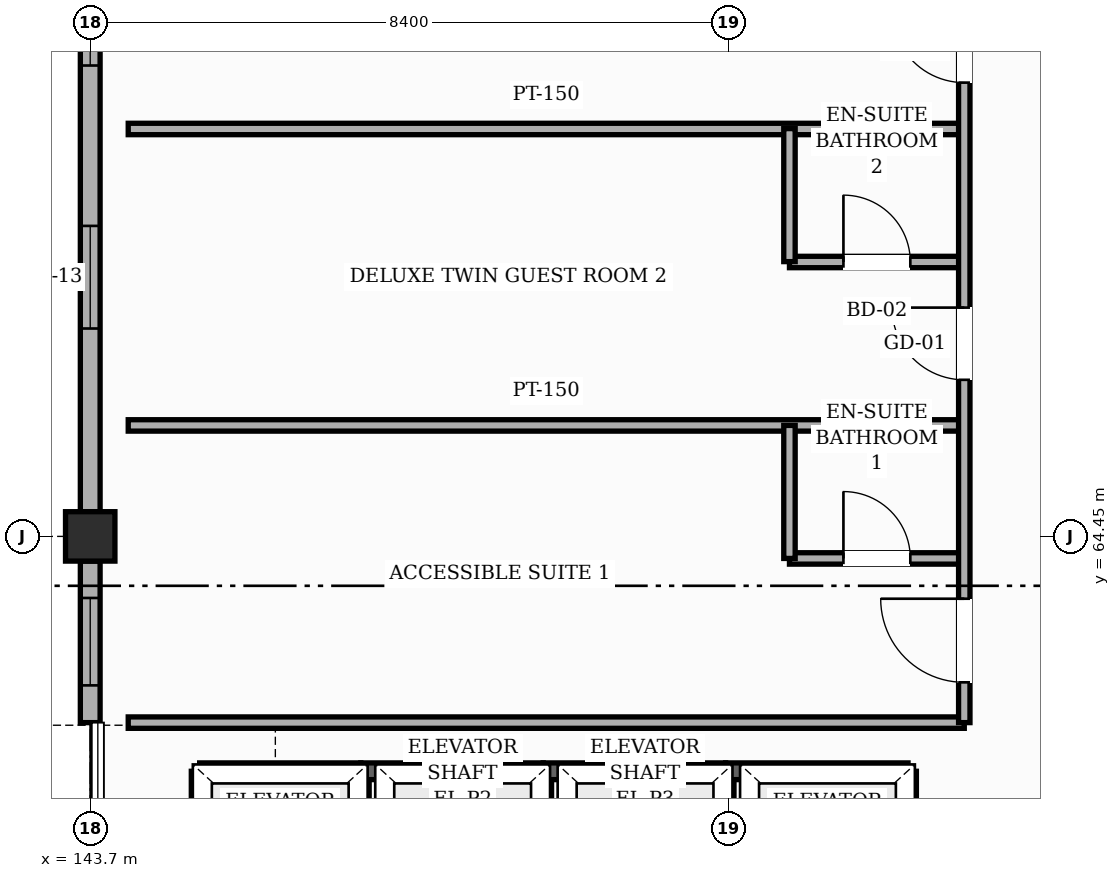
"""IFC4 building model, lengths in metres.
Left out: names, types, materials, properties, quantities, classifications, styles, units other than length and angle.
Written with IfcOpenShell. Run it as: python <this file> out.ifc"""

import sys

from ifc_helpers import new_model, si_unit, direction, frame, frame_2d, origin, origin_2d, place, context, subcontext, project, spatial, rectangle, hollow_rectangle, extrude, element, fill, save


model = new_model("IFC4")
c1 = context("Model", 3, precision=1e-05, world=origin(), true_north=direction((0.0, 1.0)))
c2 = subcontext(c1, "Body", "Model", "MODEL_VIEW")
j1 = project(units=[si_unit("LENGTHUNIT", "METRE"), si_unit("PLANEANGLEUNIT", "RADIAN")], contexts=[c1])
p1 = place(None, origin())
s1 = spatial("IfcSite", under=j1, at=p1, CompositionType="ELEMENT")
p2 = place(p1, origin())
s2 = spatial("IfcBuilding", under=s1, at=p2, CompositionType="ELEMENT")
p3 = place(p2, frame((0.0, 0.0, 15.0)))
s3 = spatial("IfcBuildingStorey", under=s2, at=p3, CompositionType="ELEMENT", Elevation=15.0)
p4 = place(p3, frame((143.7, 64.45, 0.0), z_axis=(0.0, 0.0, 1.0), x_axis=(1.0, 0.0, 0.0)))
e1 = element("IfcColumn", 1, at=p4, inside=s3, PredefinedType="COLUMN", context=c2, shape_type="SweptSolid", body=[
    extrude(hollow_rectangle(XDim=0.65, YDim=0.65, WallThickness=0.025, InnerFilletRadius=0.025, OuterFilletRadius=0.05, at=origin_2d()), origin(), (0.0, 0.0, 1.0), 4.8),
])
p5 = place(p3, frame((143.7, 62.0, 0.0), z_axis=(0.0, 0.0, 1.0), x_axis=(0.0, 1.0, 0.0)))
e2 = element("IfcWall", 2, at=p5, inside=s3, PredefinedType="SOLIDWALL", context=c2, shape_type="SweptSolid", body=[
    extrude(rectangle(XDim=2.125, YDim=0.26, at=frame_2d((1.062, 0.0))), origin(), (0.0, 0.0, 1.0), 3.985),
])
p6 = place(p5, frame((0.49, 0.0, 0.85)))
e3 = element("IfcOpeningElement", 3, at=p6, cuts=e2, PredefinedType="OPENING", context=c2, shape_type="SweptSolid", body=[
    extrude(rectangle(XDim=1.15, YDim=1.65, at=frame_2d((0.575, 0.825))), frame((0.0, 0.14, 0.0), z_axis=(0.0, -1.0, 0.0), x_axis=(1.0, 0.0, 0.0)), (0.0, 0.0, 1.0), 0.28),
])
p7 = place(p3, frame((143.7, 64.775, 0.0), z_axis=(0.0, 0.0, 1.0), x_axis=(0.0, 1.0, 0.0)))
e4 = element("IfcWall", 4, at=p7, inside=s3, PredefinedType="SOLIDWALL", context=c2, shape_type="SweptSolid", body=[
    extrude(rectangle(XDim=8.25, YDim=0.26, at=frame_2d((4.125, 0.0))), origin(), (0.0, 0.0, 1.0), 3.835),
])
p8 = place(p7, frame((2.41, 0.0, 0.85)))
e5 = element("IfcOpeningElement", 5, at=p8, cuts=e4, PredefinedType="OPENING", context=c2, shape_type="SweptSolid", body=[
    extrude(rectangle(XDim=1.35, YDim=1.65, at=frame_2d((0.675, 0.825))), frame((0.0, 0.14, 0.0), z_axis=(0.0, -1.0, 0.0), x_axis=(1.0, 0.0, 0.0)), (0.0, 0.0, 1.0), 0.28),
])
p9 = place(p7, frame((5.87, 0.0, 0.85)))
e6 = element("IfcOpeningElement", 6, at=p9, cuts=e4, PredefinedType="OPENING", context=c2, shape_type="SweptSolid", body=[
    extrude(rectangle(XDim=1.55, YDim=1.65, at=frame_2d((0.775, 0.825))), frame((0.0, 0.14, 0.0), z_axis=(0.0, -1.0, 0.0), x_axis=(1.0, 0.0, 0.0)), (0.0, 0.0, 1.0), 0.28),
])
p10 = place(p3, frame((145.14, 61.36, 0.0), z_axis=(0.0, 0.0, 1.0), x_axis=(1.0, 0.0, 0.0)))
e7 = element("IfcWall", 7, at=p10, inside=s3, PredefinedType="SHEAR", context=c2, shape_type="SweptSolid", body=[
    extrude(rectangle(XDim=2.12, YDim=0.22, at=frame_2d((1.06, 0.0))), origin(), (0.0, 0.0, 1.0), 4.56),
])
for number, where, z_axis, x_axis in (
    (8, (147.26, 59.44, 0.0), (0.0, 0.0, 1.0), (0.0, 1.0, 0.0)),
    (9, (145.14, 59.44, 0.0), (0.0, 0.0, 1.0), (0.0, 1.0, 0.0)),
):
    element("IfcWall", number, at=place(p3, frame(where, z_axis=z_axis, x_axis=x_axis)), inside=s3, PredefinedType="SHEAR", context=c2, shape_type="SweptSolid", body=[
        extrude(rectangle(XDim=1.92, YDim=0.22, at=frame_2d((0.96, 0.0))), origin(), (0.0, 0.0, 1.0), 4.56),
    ])
p11 = place(p3, frame((147.26, 61.36, 0.0), z_axis=(0.0, 0.0, 1.0), x_axis=(1.0, 0.0, 0.0)))
e10 = element("IfcWall", 10, at=p11, inside=s3, PredefinedType="SHEAR", context=c2, shape_type="SweptSolid", body=[
    extrude(rectangle(XDim=2.4, YDim=0.22, at=frame_2d((1.2, 0.0))), origin(), (0.0, 0.0, 1.0), 4.56),
])
p12 = place(p3, frame((149.66, 59.44, 0.0), z_axis=(0.0, 0.0, 1.0), x_axis=(0.0, 1.0, 0.0)))
e11 = element("IfcWall", 11, at=p12, inside=s3, PredefinedType="SHEAR", context=c2, shape_type="SweptSolid", body=[
    extrude(rectangle(XDim=1.92, YDim=0.22, at=frame_2d((0.96, 0.0))), origin(), (0.0, 0.0, 1.0), 4.56),
])
p13 = place(p3, frame((149.66, 61.36, 0.0), z_axis=(0.0, 0.0, 1.0), x_axis=(1.0, 0.0, 0.0)))
e12 = element("IfcWall", 12, at=p13, inside=s3, PredefinedType="SHEAR", context=c2, shape_type="SweptSolid", body=[
    extrude(rectangle(XDim=2.4, YDim=0.22, at=frame_2d((1.2, 0.0))), origin(), (0.0, 0.0, 1.0), 4.56),
])
p14 = place(p3, frame((152.06, 59.44, 0.0), z_axis=(0.0, 0.0, 1.0), x_axis=(0.0, 1.0, 0.0)))
e13 = element("IfcWall", 13, at=p14, inside=s3, PredefinedType="SHEAR", context=c2, shape_type="SweptSolid", body=[
    extrude(rectangle(XDim=1.92, YDim=0.22, at=frame_2d((0.96, 0.0))), origin(), (0.0, 0.0, 1.0), 4.56),
])
p15 = place(p3, frame((152.06, 61.36, 0.0), z_axis=(0.0, 0.0, 1.0), x_axis=(1.0, 0.0, 0.0)))
e14 = element("IfcWall", 14, at=p15, inside=s3, PredefinedType="SHEAR", context=c2, shape_type="SweptSolid", body=[
    extrude(rectangle(XDim=2.4, YDim=0.22, at=frame_2d((1.2, 0.0))), origin(), (0.0, 0.0, 1.0), 4.56),
])
p16 = place(p3, frame((154.46, 59.44, 0.0), z_axis=(0.0, 0.0, 1.0), x_axis=(0.0, 1.0, 0.0)))
e15 = element("IfcWall", 15, at=p16, inside=s3, PredefinedType="SHEAR", context=c2, shape_type="SweptSolid", body=[
    extrude(rectangle(XDim=1.92, YDim=0.22, at=frame_2d((0.96, 0.0))), origin(), (0.0, 0.0, 1.0), 4.56),
])
p17 = place(p3, frame((144.2, 62.0, 0.0), z_axis=(0.0, 0.0, 1.0), x_axis=(1.0, 0.0, 0.0)))
e16 = element("IfcWall", 16, at=p17, inside=s3, PredefinedType="PARTITIONING", context=c2, shape_type="SweptSolid", body=[
    extrude(rectangle(XDim=11.0, YDim=0.15, at=frame_2d((5.5, 0.0))), origin(), (0.0, 0.0, 1.0), 4.545),
])
p18 = place(p3, frame((152.9, 64.16, 0.0), z_axis=(0.0, 0.0, 1.0), x_axis=(1.0, 0.0, 0.0)))
e17 = element("IfcWall", 17, at=p18, inside=s3, PredefinedType="PARTITIONING", context=c2, shape_type="SweptSolid", body=[
    extrude(rectangle(XDim=2.3, YDim=0.15, at=frame_2d((1.15, 0.0))), origin(), (0.0, 0.0, 1.0), 3.095),
])
p19 = place(p18, frame((0.71, 0.0, 0.0)))
e18 = element("IfcOpeningElement", 18, at=p19, cuts=e17, PredefinedType="OPENING", context=c2, shape_type="SweptSolid", body=[
    extrude(rectangle(XDim=0.88, YDim=2.12, at=frame_2d((0.44, 1.06))), frame((0.0, 0.085, 0.0), z_axis=(0.0, -1.0, 0.0), x_axis=(1.0, 0.0, 0.0)), (0.0, 0.0, 1.0), 0.17),
])
p20 = place(p3, frame((144.2, 65.91, 0.0), z_axis=(0.0, 0.0, 1.0), x_axis=(1.0, 0.0, 0.0)))
e19 = element("IfcWall", 19, at=p20, inside=s3, PredefinedType="PARTITIONING", context=c2, shape_type="SweptSolid", body=[
    extrude(rectangle(XDim=11.0, YDim=0.15, at=frame_2d((5.5, 0.0))), origin(), (0.0, 0.0, 1.0), 4.545),
])
p21 = place(p3, frame((152.9, 68.06, 0.0), z_axis=(0.0, 0.0, 1.0), x_axis=(1.0, 0.0, 0.0)))
e20 = element("IfcWall", 20, at=p21, inside=s3, PredefinedType="PARTITIONING", context=c2, shape_type="SweptSolid", body=[
    extrude(rectangle(XDim=2.3, YDim=0.15, at=frame_2d((1.15, 0.0))), origin(), (0.0, 0.0, 1.0), 4.545),
])
p22 = place(p21, frame((0.71, 0.0, 0.0)))
e21 = element("IfcOpeningElement", 21, at=p22, cuts=e20, PredefinedType="OPENING", context=c2, shape_type="SweptSolid", body=[
    extrude(rectangle(XDim=0.88, YDim=2.12, at=frame_2d((0.44, 1.06))), frame((0.0, 0.085, 0.0), z_axis=(0.0, -1.0, 0.0), x_axis=(1.0, 0.0, 0.0)), (0.0, 0.0, 1.0), 0.17),
])
p23 = place(p3, frame((144.2, 69.81, 0.0), z_axis=(0.0, 0.0, 1.0), x_axis=(1.0, 0.0, 0.0)))
e22 = element("IfcWall", 22, at=p23, inside=s3, PredefinedType="PARTITIONING", context=c2, shape_type="SweptSolid", body=[
    extrude(rectangle(XDim=11.0, YDim=0.15, at=frame_2d((5.5, 0.0))), origin(), (0.0, 0.0, 1.0), 4.545),
])
for number, where, z_axis, x_axis in (
    (23, (152.9, 64.16, 0.0), (0.0, 0.0, 1.0), (0.0, 1.0, 0.0)),
    (24, (152.9, 68.065, 0.0), (0.0, 0.0, 1.0), (0.0, 1.0, 0.0)),
):
    element("IfcWall", number, at=place(p3, frame(where, z_axis=z_axis, x_axis=x_axis)), inside=s3, PredefinedType="PARTITIONING", context=c2, shape_type="SweptSolid", body=[
        extrude(rectangle(XDim=1.75, YDim=0.15, at=frame_2d((0.875, 0.0))), origin(), (0.0, 0.0, 1.0), 4.545),
    ])
p24 = place(p3, frame((155.2, 62.0, 0.0), z_axis=(0.0, 0.0, 1.0), x_axis=(0.0, 1.0, 0.0)))
e25 = element("IfcWall", 25, at=p24, inside=s3, PredefinedType="PARTITIONING", context=c2, shape_type="SweptSolid", body=[
    extrude(rectangle(XDim=50.8, YDim=0.15, at=frame_2d((25.4, 0.0))), origin(), (0.0, 0.0, 1.0), 4.545),
])
p25 = place(p24, frame((0.53, 0.0, 0.0)))
e26 = element("IfcOpeningElement", 26, at=p25, cuts=e25, PredefinedType="OPENING", context=c2, shape_type="SweptSolid", body=[
    extrude(rectangle(XDim=1.1, YDim=2.2, at=frame_2d((0.55, 1.1))), frame((0.0, 0.085, 0.0), z_axis=(0.0, -1.0, 0.0), x_axis=(1.0, 0.0, 0.0)), (0.0, 0.0, 1.0), 0.17),
])
p26 = place(p24, frame((4.51, 0.0, 0.0)))
e27 = element("IfcOpeningElement", 27, at=p26, cuts=e25, PredefinedType="OPENING", context=c2, shape_type="SweptSolid", body=[
    extrude(rectangle(XDim=0.95, YDim=2.15, at=frame_2d((0.475, 1.075))), frame((0.0, 0.085, 0.0), z_axis=(0.0, -1.0, 0.0), x_axis=(1.0, 0.0, 0.0)), (0.0, 0.0, 1.0), 0.17),
])
p27 = place(p24, frame((8.42, 0.0, 0.0)))
e28 = element("IfcOpeningElement", 28, at=p27, cuts=e25, PredefinedType="OPENING", context=c2, shape_type="SweptSolid", body=[
    extrude(rectangle(XDim=0.95, YDim=2.15, at=frame_2d((0.475, 1.075))), frame((0.0, 0.085, 0.0), z_axis=(0.0, -1.0, 0.0), x_axis=(1.0, 0.0, 0.0)), (0.0, 0.0, 1.0), 0.17),
])
p28 = place(p24, frame((12.33, 0.0, 0.0)))
e29 = element("IfcOpeningElement", 29, at=p28, cuts=e25, PredefinedType="OPENING", context=c2, shape_type="SweptSolid", body=[
    extrude(rectangle(XDim=0.95, YDim=2.15, at=frame_2d((0.475, 1.075))), frame((0.0, 0.085, 0.0), z_axis=(0.0, -1.0, 0.0), x_axis=(1.0, 0.0, 0.0)), (0.0, 0.0, 1.0), 0.17),
])
p29 = place(p24, frame((16.235, 0.0, 0.0)))
e30 = element("IfcOpeningElement", 30, at=p29, cuts=e25, PredefinedType="OPENING", context=c2, shape_type="SweptSolid", body=[
    extrude(rectangle(XDim=0.95, YDim=2.15, at=frame_2d((0.475, 1.075))), frame((0.0, 0.085, 0.0), z_axis=(0.0, -1.0, 0.0), x_axis=(1.0, 0.0, 0.0)), (0.0, 0.0, 1.0), 0.17),
])
p30 = place(p24, frame((20.145, 0.0, 0.0)))
e31 = element("IfcOpeningElement", 31, at=p30, cuts=e25, PredefinedType="OPENING", context=c2, shape_type="SweptSolid", body=[
    extrude(rectangle(XDim=0.95, YDim=2.15, at=frame_2d((0.475, 1.075))), frame((0.0, 0.085, 0.0), z_axis=(0.0, -1.0, 0.0), x_axis=(1.0, 0.0, 0.0)), (0.0, 0.0, 1.0), 0.17),
])
p31 = place(p24, frame((24.05, 0.0, 0.0)))
e32 = element("IfcOpeningElement", 32, at=p31, cuts=e25, PredefinedType="OPENING", context=c2, shape_type="SweptSolid", body=[
    extrude(rectangle(XDim=0.95, YDim=2.15, at=frame_2d((0.475, 1.075))), frame((0.0, 0.085, 0.0), z_axis=(0.0, -1.0, 0.0), x_axis=(1.0, 0.0, 0.0)), (0.0, 0.0, 1.0), 0.17),
])
p32 = place(p24, frame((27.96, 0.0, 0.0)))
e33 = element("IfcOpeningElement", 33, at=p32, cuts=e25, PredefinedType="OPENING", context=c2, shape_type="SweptSolid", body=[
    extrude(rectangle(XDim=0.95, YDim=2.15, at=frame_2d((0.475, 1.075))), frame((0.0, 0.085, 0.0), z_axis=(0.0, -1.0, 0.0), x_axis=(1.0, 0.0, 0.0)), (0.0, 0.0, 1.0), 0.17),
])
p33 = place(p24, frame((31.865, 0.0, 0.0)))
e34 = element("IfcOpeningElement", 34, at=p33, cuts=e25, PredefinedType="OPENING", context=c2, shape_type="SweptSolid", body=[
    extrude(rectangle(XDim=0.95, YDim=2.15, at=frame_2d((0.475, 1.075))), frame((0.0, 0.085, 0.0), z_axis=(0.0, -1.0, 0.0), x_axis=(1.0, 0.0, 0.0)), (0.0, 0.0, 1.0), 0.17),
])
p34 = place(p24, frame((35.77, 0.0, 0.0)))
e35 = element("IfcOpeningElement", 35, at=p34, cuts=e25, PredefinedType="OPENING", context=c2, shape_type="SweptSolid", body=[
    extrude(rectangle(XDim=0.95, YDim=2.15, at=frame_2d((0.475, 1.075))), frame((0.0, 0.085, 0.0), z_axis=(0.0, -1.0, 0.0), x_axis=(1.0, 0.0, 0.0)), (0.0, 0.0, 1.0), 0.17),
])
p35 = place(p24, frame((39.68, 0.0, 0.0)))
e36 = element("IfcOpeningElement", 36, at=p35, cuts=e25, PredefinedType="OPENING", context=c2, shape_type="SweptSolid", body=[
    extrude(rectangle(XDim=0.95, YDim=2.15, at=frame_2d((0.475, 1.075))), frame((0.0, 0.085, 0.0), z_axis=(0.0, -1.0, 0.0), x_axis=(1.0, 0.0, 0.0)), (0.0, 0.0, 1.0), 0.17),
])
p36 = place(p24, frame((43.59, 0.0, 0.0)))
e37 = element("IfcOpeningElement", 37, at=p36, cuts=e25, PredefinedType="OPENING", context=c2, shape_type="SweptSolid", body=[
    extrude(rectangle(XDim=0.95, YDim=2.15, at=frame_2d((0.475, 1.075))), frame((0.0, 0.085, 0.0), z_axis=(0.0, -1.0, 0.0), x_axis=(1.0, 0.0, 0.0)), (0.0, 0.0, 1.0), 0.17),
])
p37 = place(p24, frame((47.495, 0.0, 0.0)))
e38 = element("IfcOpeningElement", 38, at=p37, cuts=e25, PredefinedType="OPENING", context=c2, shape_type="SweptSolid", body=[
    extrude(rectangle(XDim=0.95, YDim=2.15, at=frame_2d((0.475, 1.075))), frame((0.0, 0.085, 0.0), z_axis=(0.0, -1.0, 0.0), x_axis=(1.0, 0.0, 0.0)), (0.0, 0.0, 1.0), 0.17),
])
p38 = place(p6, origin())
e39 = element("IfcWindow", 39, at=p38, inside=s3, PartitioningType="SINGLE_PANEL", PredefinedType="WINDOW", context=c2, shape_type="SweptSolid", body=[
    extrude(rectangle(XDim=1.15, YDim=1.65, at=frame_2d((0.575, 0.825))), frame((0.0, 0.03, 0.0), z_axis=(0.0, -1.0, 0.0), x_axis=(1.0, 0.0, 0.0)), (0.0, 0.0, 1.0), 0.06),
])
fill(e3, e39)
p39 = place(p8, origin())
e40 = element("IfcWindow", 40, at=p39, inside=s3, PartitioningType="SINGLE_PANEL", PredefinedType="WINDOW", context=c2, shape_type="SweptSolid", body=[
    extrude(rectangle(XDim=1.35, YDim=1.65, at=frame_2d((0.675, 0.825))), frame((0.0, 0.03, 0.0), z_axis=(0.0, -1.0, 0.0), x_axis=(1.0, 0.0, 0.0)), (0.0, 0.0, 1.0), 0.06),
])
fill(e5, e40)
p40 = place(p9, origin())
e41 = element("IfcWindow", 41, at=p40, inside=s3, PartitioningType="SINGLE_PANEL", PredefinedType="WINDOW", context=c2, shape_type="SweptSolid", body=[
    extrude(rectangle(XDim=1.55, YDim=1.65, at=frame_2d((0.775, 0.825))), frame((0.0, 0.03, 0.0), z_axis=(0.0, -1.0, 0.0), x_axis=(1.0, 0.0, 0.0)), (0.0, 0.0, 1.0), 0.06),
])
fill(e6, e41)
p41 = place(p25, origin())
e42 = element("IfcDoor", 42, at=p41, inside=s3, OperationType="SINGLE_SWING_RIGHT", PredefinedType="DOOR", context=c2, shape_type="SweptSolid", body=[
    extrude(rectangle(XDim=1.1, YDim=2.2, at=frame_2d((0.55, 1.1))), frame((0.0, 0.025, 0.0), z_axis=(0.0, -1.0, 0.0), x_axis=(1.0, 0.0, 0.0)), (0.0, 0.0, 1.0), 0.05),
])
fill(e26, e42)
p42 = place(p19, origin())
e43 = element("IfcDoor", 43, at=p42, inside=s3, OperationType="SINGLE_SWING_LEFT", PredefinedType="DOOR", context=c2, shape_type="SweptSolid", body=[
    extrude(rectangle(XDim=0.88, YDim=2.12, at=frame_2d((0.44, 1.06))), frame((0.0, 0.025, 0.0), z_axis=(0.0, -1.0, 0.0), x_axis=(1.0, 0.0, 0.0)), (0.0, 0.0, 1.0), 0.05),
])
fill(e18, e43)
p43 = place(p26, origin())
e44 = element("IfcDoor", 44, at=p43, inside=s3, OperationType="SINGLE_SWING_RIGHT", PredefinedType="DOOR", context=c2, shape_type="SweptSolid", body=[
    extrude(rectangle(XDim=0.95, YDim=2.15, at=frame_2d((0.475, 1.075))), frame((0.0, 0.025, 0.0), z_axis=(0.0, -1.0, 0.0), x_axis=(1.0, 0.0, 0.0)), (0.0, 0.0, 1.0), 0.05),
])
fill(e27, e44)
p44 = place(p22, origin())
e45 = element("IfcDoor", 45, at=p44, inside=s3, OperationType="SINGLE_SWING_LEFT", PredefinedType="DOOR", context=c2, shape_type="SweptSolid", body=[
    extrude(rectangle(XDim=0.88, YDim=2.12, at=frame_2d((0.44, 1.06))), frame((0.0, 0.025, 0.0), z_axis=(0.0, -1.0, 0.0), x_axis=(1.0, 0.0, 0.0)), (0.0, 0.0, 1.0), 0.05),
])
fill(e21, e45)
p45 = place(p27, origin())
e46 = element("IfcDoor", 46, at=p45, inside=s3, OperationType="SINGLE_SWING_RIGHT", PredefinedType="DOOR", context=c2, shape_type="SweptSolid", body=[
    extrude(rectangle(XDim=0.95, YDim=2.15, at=frame_2d((0.475, 1.075))), frame((0.0, 0.025, 0.0), z_axis=(0.0, -1.0, 0.0), x_axis=(1.0, 0.0, 0.0)), (0.0, 0.0, 1.0), 0.05),
])
fill(e28, e46)
save(model, sys.argv[1])
